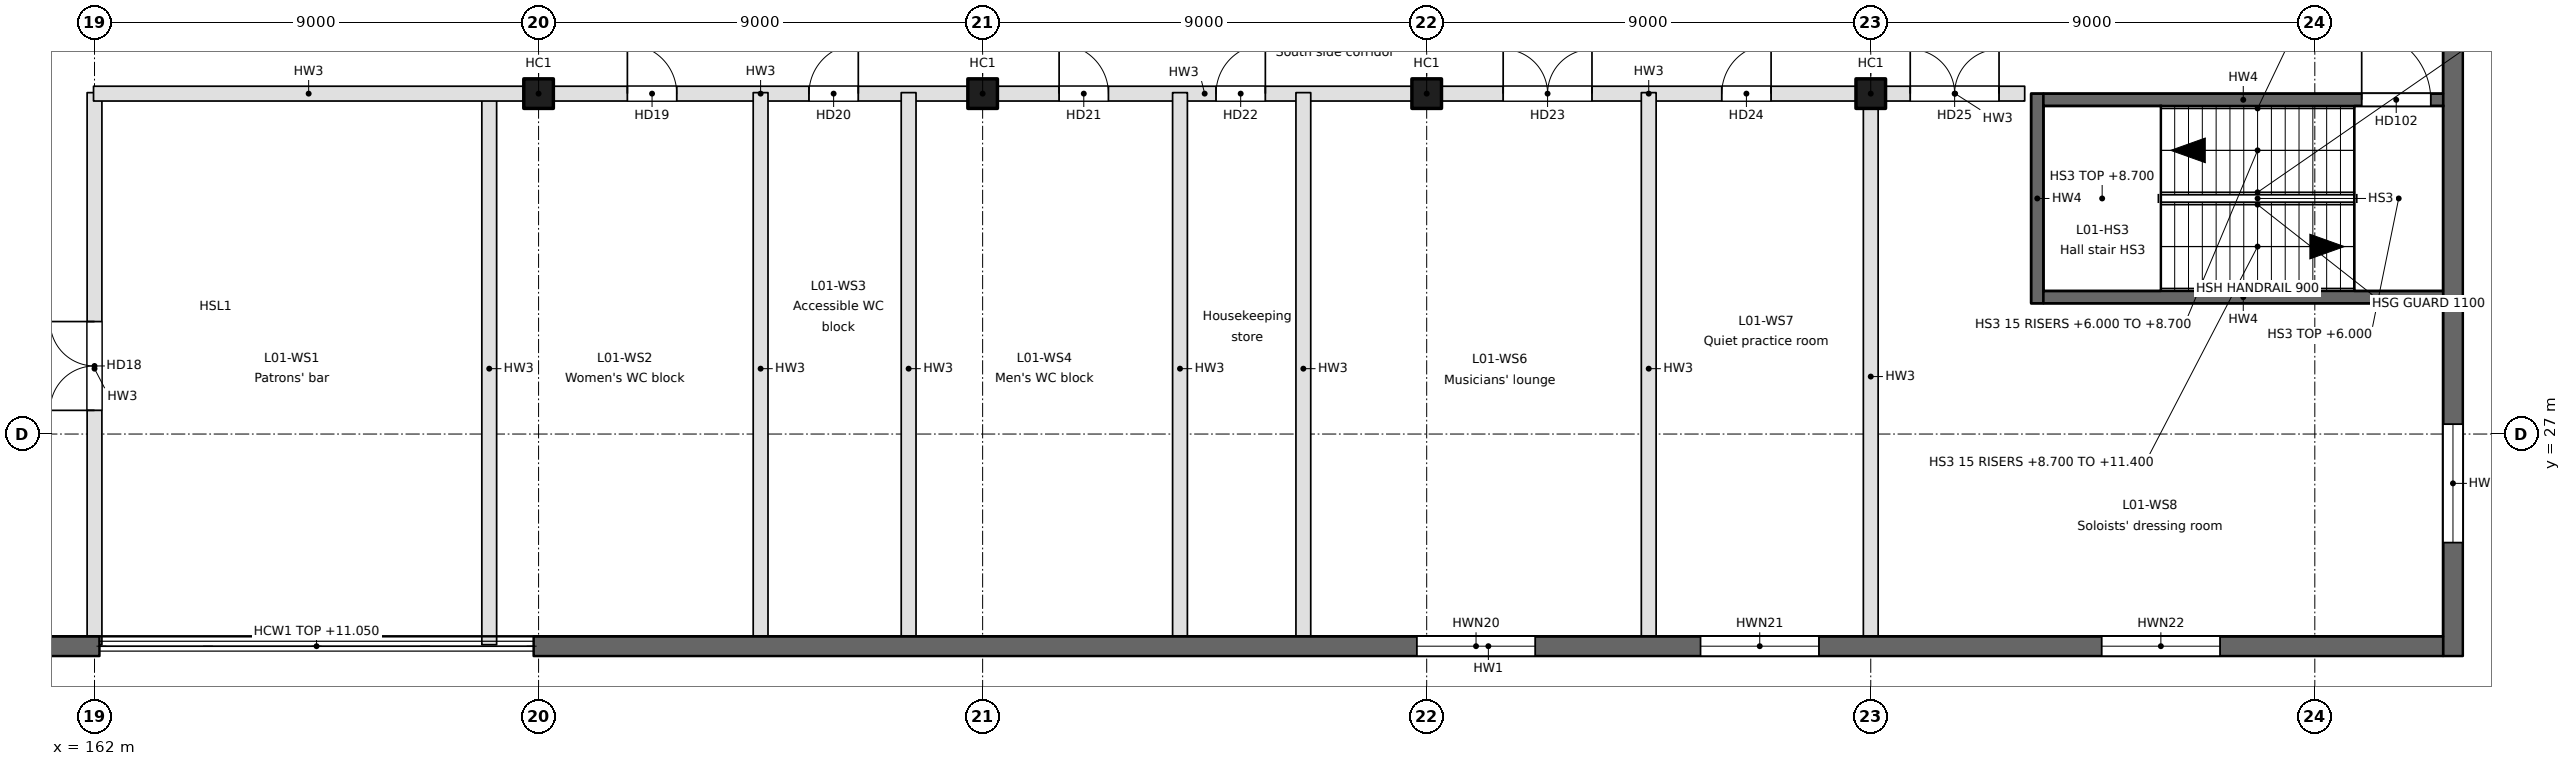
"""IFC4 building model, lengths in metres.
Left out: names, types, materials, properties, quantities, classifications, styles, units other than length and angle.
Written with IfcOpenShell. Run it as: python <this file> out.ifc"""

import sys

from ifc_helpers import new_model, si_unit, direction, frame, frame_2d, origin, origin_2d, place, context, subcontext, project, spatial, rectangle, extrude, element, fill, save


model = new_model("IFC4")
c1 = context("Model", 3, precision=1e-05, world=origin(), true_north=direction((0.0, 1.0)))
c2 = subcontext(c1, "Body", "Model", "MODEL_VIEW")
j1 = project(units=[si_unit("LENGTHUNIT", "METRE"), si_unit("PLANEANGLEUNIT", "RADIAN")], contexts=[c1])
p1 = place(None, origin())
s1 = spatial("IfcSite", under=j1, at=p1, CompositionType="ELEMENT")
p2 = place(p1, origin())
s2 = spatial("IfcBuilding", under=s1, at=p2, CompositionType="ELEMENT")
p3 = place(p2, frame((0.0, 0.0, 6.0)))
s3 = spatial("IfcBuildingStorey", under=s2, at=p3, CompositionType="ELEMENT", Elevation=6.0)
for number, where, z_axis, x_axis in (
    (1, (171.0, 33.9, 0.0), (0.0, 0.0, 1.0), (1.0, 0.0, 0.0)),
    (2, (180.0, 33.9, 0.0), (0.0, 0.0, 1.0), (1.0, 0.0, 0.0)),
    (3, (189.0, 33.9, 0.0), (0.0, 0.0, 1.0), (1.0, 0.0, 0.0)),
    (4, (198.0, 33.9, 0.0), (0.0, 0.0, 1.0), (1.0, 0.0, 0.0)),
):
    element("IfcColumn", number, at=place(p3, frame(where, z_axis=z_axis, x_axis=x_axis)), inside=s3, PredefinedType="COLUMN", context=c2, shape_type="SweptSolid", body=[
        extrude(rectangle(XDim=0.6, YDim=0.6, at=origin_2d()), origin(), (0.0, 0.0, 1.0), 5.4),
    ])
p4 = place(p3, frame((209.8, 76.5, -0.35), z_axis=(0.0, 0.0, 1.0), x_axis=(0.0, -1.0, 0.0)))
e5 = element("IfcWall", 5, at=p4, inside=s3, PredefinedType="SOLIDWALL", context=c2, shape_type="SweptSolid", body=[
    extrude(rectangle(XDim=54.0, YDim=0.4, at=frame_2d((27.0, 0.0))), origin(), (0.0, 0.0, 1.0), 5.4),
])
p5 = place(p4, frame((49.3, 0.0, 1.25)))
e6 = element("IfcOpeningElement", 6, at=p5, cuts=e5, PredefinedType="OPENING", context=c2, shape_type="SweptSolid", body=[
    extrude(rectangle(XDim=2.4, YDim=1.8, at=frame_2d((1.2, 0.9))), frame((0.0, 0.2, 0.0), z_axis=(0.0, -1.0, 0.0), x_axis=(1.0, 0.0, 0.0)), (0.0, 0.0, 1.0), 0.4),
])
p6 = place(p4, frame((2.3, 0.0, 1.25)))
e7 = element("IfcOpeningElement", 7, at=p6, cuts=e5, PredefinedType="OPENING", context=c2, shape_type="SweptSolid", body=[
    extrude(rectangle(XDim=2.4, YDim=1.8, at=frame_2d((1.2, 0.9))), frame((0.0, 0.2, 0.0), z_axis=(0.0, -1.0, 0.0), x_axis=(1.0, 0.0, 0.0)), (0.0, 0.0, 1.0), 0.4),
])
p7 = place(p3, frame((209.6, 22.7, -0.35), z_axis=(0.0, 0.0, 1.0), x_axis=(-1.0, 0.0, 0.0)))
e8 = element("IfcWall", 8, at=p7, inside=s3, PredefinedType="SOLIDWALL", context=c2, shape_type="SweptSolid", body=[
    extrude(rectangle(XDim=38.7, YDim=0.4, at=frame_2d((19.35, 0.0))), origin(), (0.0, 0.0, 1.0), 5.4),
])
p8 = place(p7, frame((18.4, 0.0, 1.25)))
e9 = element("IfcOpeningElement", 9, at=p8, cuts=e8, PredefinedType="OPENING", context=c2, shape_type="SweptSolid", body=[
    extrude(rectangle(XDim=2.4, YDim=1.8, at=frame_2d((1.2, 0.9))), frame((0.0, 0.2, 0.0), z_axis=(0.0, -1.0, 0.0), x_axis=(1.0, 0.0, 0.0)), (0.0, 0.0, 1.0), 0.4),
])
p9 = place(p7, frame((12.65, 0.0, 1.25)))
e10 = element("IfcOpeningElement", 10, at=p9, cuts=e8, PredefinedType="OPENING", context=c2, shape_type="SweptSolid", body=[
    extrude(rectangle(XDim=2.4, YDim=1.8, at=frame_2d((1.2, 0.9))), frame((0.0, 0.2, 0.0), z_axis=(0.0, -1.0, 0.0), x_axis=(1.0, 0.0, 0.0)), (0.0, 0.0, 1.0), 0.4),
])
p10 = place(p7, frame((4.52, 0.0, 1.25)))
e11 = element("IfcOpeningElement", 11, at=p10, cuts=e8, PredefinedType="OPENING", context=c2, shape_type="SweptSolid", body=[
    extrude(rectangle(XDim=2.4, YDim=1.8, at=frame_2d((1.2, 0.9))), frame((0.0, 0.2, 0.0), z_axis=(0.0, -1.0, 0.0), x_axis=(1.0, 0.0, 0.0)), (0.0, 0.0, 1.0), 0.4),
])
p11 = place(p3, frame((162.1, 22.7, -0.35), z_axis=(0.0, 0.0, 1.0), x_axis=(-1.0, 0.0, 0.0)))
e12 = element("IfcWall", 12, at=p11, inside=s3, PredefinedType="SOLIDWALL", context=c2, shape_type="SweptSolid", body=[
    extrude(rectangle(XDim=11.7, YDim=0.4, at=frame_2d((5.85, 0.0))), origin(), (0.0, 0.0, 1.0), 5.4),
])
p12 = place(p11, frame((2.9, 0.0, 1.25)))
e13 = element("IfcOpeningElement", 13, at=p12, cuts=e12, PredefinedType="OPENING", context=c2, shape_type="SweptSolid", body=[
    extrude(rectangle(XDim=2.4, YDim=1.8, at=frame_2d((1.2, 0.9))), frame((0.0, 0.2, 0.0), z_axis=(0.0, -1.0, 0.0), x_axis=(1.0, 0.0, 0.0)), (0.0, 0.0, 1.0), 0.4),
])
p13 = place(p3, frame((162.0, 22.73, 0.0), z_axis=(0.0, 0.0, 1.0), x_axis=(0.0, 1.0, 0.0)))
e14 = element("IfcWall", 14, at=p13, inside=s3, PredefinedType="PARTITIONING", context=c2, shape_type="SweptSolid", body=[
    extrude(rectangle(XDim=11.19, YDim=0.3, at=frame_2d((5.595, 0.0))), origin(), (0.0, 0.0, 1.0), 5.05),
])
p14 = place(p13, frame((4.75, 0.0, 0.0)))
e15 = element("IfcOpeningElement", 15, at=p14, cuts=e14, PredefinedType="OPENING", context=c2, shape_type="SweptSolid", body=[
    extrude(rectangle(XDim=1.8, YDim=2.1, at=frame_2d((0.9, 1.05))), frame((0.0, 0.15, 0.0), z_axis=(0.0, -1.0, 0.0), x_axis=(1.0, 0.0, 0.0)), (0.0, 0.0, 1.0), 0.3),
])
p15 = place(p3, frame((170.0, 22.73, 0.0), z_axis=(0.0, 0.0, 1.0), x_axis=(0.0, 1.0, 0.0)))
e16 = element("IfcWall", 16, at=p15, inside=s3, PredefinedType="PARTITIONING", context=c2, shape_type="SweptSolid", body=[
    extrude(rectangle(XDim=11.19, YDim=0.3, at=frame_2d((5.595, 0.0))), origin(), (0.0, 0.0, 1.0), 5.05),
])
p16 = place(p3, frame((161.98, 33.9, 0.0), z_axis=(0.0, 0.0, 1.0), x_axis=(1.0, 0.0, 0.0)))
e17 = element("IfcWall", 17, at=p16, inside=s3, PredefinedType="PARTITIONING", context=c2, shape_type="SweptSolid", body=[
    extrude(rectangle(XDim=8.72, YDim=0.3, at=frame_2d((4.36, 0.0))), origin(), (0.0, 0.0, 1.0), 5.05),
])
p17 = place(p3, frame((171.3, 33.9, 0.0), z_axis=(0.0, 0.0, 1.0), x_axis=(1.0, 0.0, 0.0)))
e18 = element("IfcWall", 18, at=p17, inside=s3, PredefinedType="PARTITIONING", context=c2, shape_type="SweptSolid", body=[
    extrude(rectangle(XDim=8.4, YDim=0.3, at=frame_2d((4.2, 0.0))), origin(), (0.0, 0.0, 1.0), 5.05),
])
p18 = place(p17, frame((1.5, 0.0, 0.0)))
e19 = element("IfcOpeningElement", 19, at=p18, cuts=e18, PredefinedType="OPENING", context=c2, shape_type="SweptSolid", body=[
    extrude(rectangle(XDim=1.0, YDim=2.1, at=frame_2d((0.5, 1.05))), frame((0.0, 0.15, 0.0), z_axis=(0.0, -1.0, 0.0), x_axis=(1.0, 0.0, 0.0)), (0.0, 0.0, 1.0), 0.3),
])
p19 = place(p17, frame((5.18, 0.0, 0.0)))
e20 = element("IfcOpeningElement", 20, at=p19, cuts=e18, PredefinedType="OPENING", context=c2, shape_type="SweptSolid", body=[
    extrude(rectangle(XDim=1.0, YDim=2.1, at=frame_2d((0.5, 1.05))), frame((0.0, 0.15, 0.0), z_axis=(0.0, -1.0, 0.0), x_axis=(1.0, 0.0, 0.0)), (0.0, 0.0, 1.0), 0.3),
])
p20 = place(p3, frame((180.3, 33.9, 0.0), z_axis=(0.0, 0.0, 1.0), x_axis=(1.0, 0.0, 0.0)))
e21 = element("IfcWall", 21, at=p20, inside=s3, PredefinedType="PARTITIONING", context=c2, shape_type="SweptSolid", body=[
    extrude(rectangle(XDim=8.4, YDim=0.3, at=frame_2d((4.2, 0.0))), origin(), (0.0, 0.0, 1.0), 5.05),
])
p21 = place(p20, frame((1.25, 0.0, 0.0)))
e22 = element("IfcOpeningElement", 22, at=p21, cuts=e21, PredefinedType="OPENING", context=c2, shape_type="SweptSolid", body=[
    extrude(rectangle(XDim=1.0, YDim=2.1, at=frame_2d((0.5, 1.05))), frame((0.0, 0.15, 0.0), z_axis=(0.0, -1.0, 0.0), x_axis=(1.0, 0.0, 0.0)), (0.0, 0.0, 1.0), 0.3),
])
p22 = place(p20, frame((4.43, 0.0, 0.0)))
e23 = element("IfcOpeningElement", 23, at=p22, cuts=e21, PredefinedType="OPENING", context=c2, shape_type="SweptSolid", body=[
    extrude(rectangle(XDim=1.0, YDim=2.1, at=frame_2d((0.5, 1.05))), frame((0.0, 0.15, 0.0), z_axis=(0.0, -1.0, 0.0), x_axis=(1.0, 0.0, 0.0)), (0.0, 0.0, 1.0), 0.3),
])
p23 = place(p3, frame((189.3, 33.9, 0.0), z_axis=(0.0, 0.0, 1.0), x_axis=(1.0, 0.0, 0.0)))
e24 = element("IfcWall", 24, at=p23, inside=s3, PredefinedType="PARTITIONING", context=c2, shape_type="SweptSolid", body=[
    extrude(rectangle(XDim=8.4, YDim=0.3, at=frame_2d((4.2, 0.0))), origin(), (0.0, 0.0, 1.0), 5.05),
])
p24 = place(p23, frame((1.25, 0.0, 0.0)))
e25 = element("IfcOpeningElement", 25, at=p24, cuts=e24, PredefinedType="OPENING", context=c2, shape_type="SweptSolid", body=[
    extrude(rectangle(XDim=1.8, YDim=2.1, at=frame_2d((0.9, 1.05))), frame((0.0, 0.15, 0.0), z_axis=(0.0, -1.0, 0.0), x_axis=(1.0, 0.0, 0.0)), (0.0, 0.0, 1.0), 0.3),
])
p25 = place(p23, frame((5.68, 0.0, 0.0)))
e26 = element("IfcOpeningElement", 26, at=p25, cuts=e24, PredefinedType="OPENING", context=c2, shape_type="SweptSolid", body=[
    extrude(rectangle(XDim=1.0, YDim=2.1, at=frame_2d((0.5, 1.05))), frame((0.0, 0.15, 0.0), z_axis=(0.0, -1.0, 0.0), x_axis=(1.0, 0.0, 0.0)), (0.0, 0.0, 1.0), 0.3),
])
p26 = place(p3, frame((198.3, 33.9, 0.0), z_axis=(0.0, 0.0, 1.0), x_axis=(1.0, 0.0, 0.0)))
e27 = element("IfcWall", 27, at=p26, inside=s3, PredefinedType="PARTITIONING", context=c2, shape_type="SweptSolid", body=[
    extrude(rectangle(XDim=2.82, YDim=0.3, at=frame_2d((1.41, 0.0))), origin(), (0.0, 0.0, 1.0), 5.05),
])
p27 = place(p26, frame((0.5, 0.0, 0.0)))
e28 = element("IfcOpeningElement", 28, at=p27, cuts=e27, PredefinedType="OPENING", context=c2, shape_type="SweptSolid", body=[
    extrude(rectangle(XDim=1.8, YDim=2.1, at=frame_2d((0.9, 1.05))), frame((0.0, 0.15, 0.0), z_axis=(0.0, -1.0, 0.0), x_axis=(1.0, 0.0, 0.0)), (0.0, 0.0, 1.0), 0.3),
])
for number, where, z_axis, x_axis in (
    (29, (175.5, 22.73, 0.0), (0.0, 0.0, 1.0), (0.0, 1.0, 0.0)),
    (30, (178.5, 22.73, 0.0), (0.0, 0.0, 1.0), (0.0, 1.0, 0.0)),
    (31, (184.0, 22.73, 0.0), (0.0, 0.0, 1.0), (0.0, 1.0, 0.0)),
    (32, (186.5, 22.73, 0.0), (0.0, 0.0, 1.0), (0.0, 1.0, 0.0)),
    (33, (193.5, 22.73, 0.0), (0.0, 0.0, 1.0), (0.0, 1.0, 0.0)),
):
    element("IfcWall", number, at=place(p3, frame(where, z_axis=z_axis, x_axis=x_axis)), inside=s3, PredefinedType="PARTITIONING", context=c2, shape_type="SweptSolid", body=[
        extrude(rectangle(XDim=11.19, YDim=0.3, at=frame_2d((5.595, 0.0))), origin(), (0.0, 0.0, 1.0), 5.05),
    ])
p28 = place(p3, frame((198.0, 22.73, 0.0), z_axis=(0.0, 0.0, 1.0), x_axis=(0.0, 1.0, 0.0)))
e34 = element("IfcWall", 34, at=p28, inside=s3, PredefinedType="PARTITIONING", context=c2, shape_type="SweptSolid", body=[
    extrude(rectangle(XDim=10.87, YDim=0.3, at=frame_2d((5.435, 0.0))), origin(), (0.0, 0.0, 1.0), 5.05),
])
p29 = place(p3, frame((201.375, 29.65, -0.35), z_axis=(0.0, 0.0, 1.0), x_axis=(0.0, 1.0, 0.0)))
e35 = element("IfcWall", 35, at=p29, inside=s3, PredefinedType="SOLIDWALL", context=c2, shape_type="SweptSolid", body=[
    extrude(rectangle(XDim=4.25, YDim=0.25, at=frame_2d((2.125, 0.0))), origin(), (0.0, 0.0, 1.0), 5.4),
])
p30 = place(p3, frame((209.6, 29.775, -0.35), z_axis=(0.0, 0.0, 1.0), x_axis=(-1.0, 0.0, 0.0)))
e36 = element("IfcWall", 36, at=p30, inside=s3, PredefinedType="SOLIDWALL", context=c2, shape_type="SweptSolid", body=[
    extrude(rectangle(XDim=8.1, YDim=0.25, at=frame_2d((4.05, 0.0))), origin(), (0.0, 0.0, 1.0), 5.4),
])
p31 = place(p3, frame((201.5, 33.775, -0.35), z_axis=(0.0, 0.0, 1.0), x_axis=(1.0, 0.0, 0.0)))
e37 = element("IfcWall", 37, at=p31, inside=s3, PredefinedType="SOLIDWALL", context=c2, shape_type="SweptSolid", body=[
    extrude(rectangle(XDim=8.1, YDim=0.25, at=frame_2d((4.05, 0.0))), origin(), (0.0, 0.0, 1.0), 5.4),
])
p32 = place(p31, frame((6.45, 0.0, 0.35)))
e38 = element("IfcOpeningElement", 38, at=p32, cuts=e37, PredefinedType="OPENING", context=c2, shape_type="SweptSolid", body=[
    extrude(rectangle(XDim=1.4, YDim=2.1, at=frame_2d((0.7, 1.05))), frame((0.0, 0.125, 0.0), z_axis=(0.0, -1.0, 0.0), x_axis=(1.0, 0.0, 0.0)), (0.0, 0.0, 1.0), 0.25),
])
p33 = place(p14, origin())
e39 = element("IfcDoor", 39, at=p33, inside=s3, OperationType="DOUBLE_DOOR_SINGLE_SWING", PredefinedType="DOOR", context=c2, shape_type="SweptSolid", body=[
    extrude(rectangle(XDim=1.8, YDim=2.1, at=frame_2d((0.9, 1.05))), frame((0.0, 0.025, 0.0), z_axis=(0.0, -1.0, 0.0), x_axis=(1.0, 0.0, 0.0)), (0.0, 0.0, 1.0), 0.05),
])
fill(e15, e39)
p34 = place(p18, origin())
e40 = element("IfcDoor", 40, at=p34, inside=s3, OperationType="SINGLE_SWING_LEFT", PredefinedType="DOOR", context=c2, shape_type="SweptSolid", body=[
    extrude(rectangle(XDim=1.0, YDim=2.1, at=frame_2d((0.5, 1.05))), frame((0.0, 0.025, 0.0), z_axis=(0.0, -1.0, 0.0), x_axis=(1.0, 0.0, 0.0)), (0.0, 0.0, 1.0), 0.05),
])
fill(e19, e40)
p35 = place(p19, origin())
e41 = element("IfcDoor", 41, at=p35, inside=s3, OperationType="SINGLE_SWING_RIGHT", PredefinedType="DOOR", context=c2, shape_type="SweptSolid", body=[
    extrude(rectangle(XDim=1.0, YDim=2.1, at=frame_2d((0.5, 1.05))), frame((0.0, 0.025, 0.0), z_axis=(0.0, -1.0, 0.0), x_axis=(1.0, 0.0, 0.0)), (0.0, 0.0, 1.0), 0.05),
])
fill(e20, e41)
p36 = place(p21, origin())
e42 = element("IfcDoor", 42, at=p36, inside=s3, OperationType="SINGLE_SWING_LEFT", PredefinedType="DOOR", context=c2, shape_type="SweptSolid", body=[
    extrude(rectangle(XDim=1.0, YDim=2.1, at=frame_2d((0.5, 1.05))), frame((0.0, 0.025, 0.0), z_axis=(0.0, -1.0, 0.0), x_axis=(1.0, 0.0, 0.0)), (0.0, 0.0, 1.0), 0.05),
])
fill(e22, e42)
p37 = place(p22, origin())
e43 = element("IfcDoor", 43, at=p37, inside=s3, OperationType="SINGLE_SWING_RIGHT", PredefinedType="DOOR", context=c2, shape_type="SweptSolid", body=[
    extrude(rectangle(XDim=1.0, YDim=2.1, at=frame_2d((0.5, 1.05))), frame((0.0, 0.025, 0.0), z_axis=(0.0, -1.0, 0.0), x_axis=(1.0, 0.0, 0.0)), (0.0, 0.0, 1.0), 0.05),
])
fill(e23, e43)
p38 = place(p24, origin())
e44 = element("IfcDoor", 44, at=p38, inside=s3, OperationType="DOUBLE_DOOR_SINGLE_SWING", PredefinedType="DOOR", context=c2, shape_type="SweptSolid", body=[
    extrude(rectangle(XDim=1.8, YDim=2.1, at=frame_2d((0.9, 1.05))), frame((0.0, 0.025, 0.0), z_axis=(0.0, -1.0, 0.0), x_axis=(1.0, 0.0, 0.0)), (0.0, 0.0, 1.0), 0.05),
])
fill(e25, e44)
p39 = place(p25, origin())
e45 = element("IfcDoor", 45, at=p39, inside=s3, OperationType="SINGLE_SWING_RIGHT", PredefinedType="DOOR", context=c2, shape_type="SweptSolid", body=[
    extrude(rectangle(XDim=1.0, YDim=2.1, at=frame_2d((0.5, 1.05))), frame((0.0, 0.025, 0.0), z_axis=(0.0, -1.0, 0.0), x_axis=(1.0, 0.0, 0.0)), (0.0, 0.0, 1.0), 0.05),
])
fill(e26, e45)
p40 = place(p27, origin())
e46 = element("IfcDoor", 46, at=p40, inside=s3, OperationType="DOUBLE_DOOR_SINGLE_SWING", PredefinedType="DOOR", context=c2, shape_type="SweptSolid", body=[
    extrude(rectangle(XDim=1.8, YDim=2.1, at=frame_2d((0.9, 1.05))), frame((0.0, 0.025, 0.0), z_axis=(0.0, -1.0, 0.0), x_axis=(1.0, 0.0, 0.0)), (0.0, 0.0, 1.0), 0.05),
])
fill(e28, e46)
p41 = place(p5, origin())
e47 = element("IfcWindow", 47, at=p41, inside=s3, PartitioningType="SINGLE_PANEL", PredefinedType="WINDOW", context=c2, shape_type="SweptSolid", body=[
    extrude(rectangle(XDim=2.4, YDim=1.8, at=frame_2d((1.2, 0.9))), frame((0.0, 0.03, 0.0), z_axis=(0.0, -1.0, 0.0), x_axis=(1.0, 0.0, 0.0)), (0.0, 0.0, 1.0), 0.06),
])
fill(e6, e47)
p42 = place(p8, origin())
e48 = element("IfcWindow", 48, at=p42, inside=s3, PartitioningType="SINGLE_PANEL", PredefinedType="WINDOW", context=c2, shape_type="SweptSolid", body=[
    extrude(rectangle(XDim=2.4, YDim=1.8, at=frame_2d((1.2, 0.9))), frame((0.0, 0.03, 0.0), z_axis=(0.0, -1.0, 0.0), x_axis=(1.0, 0.0, 0.0)), (0.0, 0.0, 1.0), 0.06),
])
fill(e9, e48)
p43 = place(p9, origin())
e49 = element("IfcWindow", 49, at=p43, inside=s3, PartitioningType="SINGLE_PANEL", PredefinedType="WINDOW", context=c2, shape_type="SweptSolid", body=[
    extrude(rectangle(XDim=2.4, YDim=1.8, at=frame_2d((1.2, 0.9))), frame((0.0, 0.03, 0.0), z_axis=(0.0, -1.0, 0.0), x_axis=(1.0, 0.0, 0.0)), (0.0, 0.0, 1.0), 0.06),
])
fill(e10, e49)
p44 = place(p10, origin())
e50 = element("IfcWindow", 50, at=p44, inside=s3, PartitioningType="SINGLE_PANEL", PredefinedType="WINDOW", context=c2, shape_type="SweptSolid", body=[
    extrude(rectangle(XDim=2.4, YDim=1.8, at=frame_2d((1.2, 0.9))), frame((0.0, 0.03, 0.0), z_axis=(0.0, -1.0, 0.0), x_axis=(1.0, 0.0, 0.0)), (0.0, 0.0, 1.0), 0.06),
])
fill(e11, e50)
p45 = place(p32, origin())
e51 = element("IfcDoor", 51, at=p45, inside=s3, OperationType="SINGLE_SWING_LEFT", PredefinedType="DOOR", context=c2, shape_type="SweptSolid", body=[
    extrude(rectangle(XDim=1.4, YDim=2.1, at=frame_2d((0.7, 1.05))), frame((0.0, 0.025, 0.0), z_axis=(0.0, -1.0, 0.0), x_axis=(1.0, 0.0, 0.0)), (0.0, 0.0, 1.0), 0.05),
])
fill(e38, e51)
save(model, sys.argv[1])
